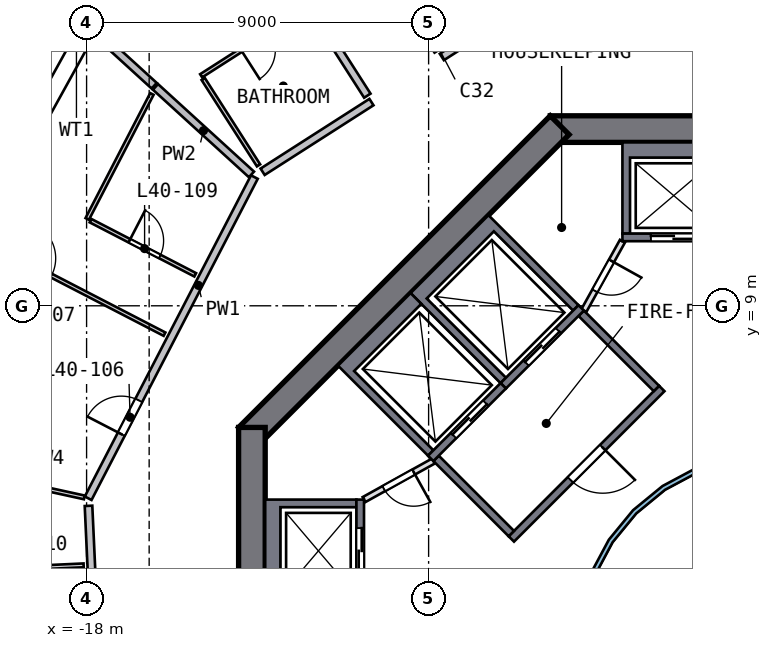
"""IFC4 building model, lengths in metres.
Left out: names, types, materials, properties, quantities, classifications, styles, units other than length and angle.
Written with IfcOpenShell. Run it as: python <this file> out.ifc"""

import sys

from ifc_helpers import new_model, si_unit, direction, frame, frame_2d, origin, place, context, subcontext, project, spatial, polyline, rectangle, outline, extrude, element, fill, save


model = new_model("IFC4")
c1 = context("Model", 3, precision=1e-05, world=origin(), true_north=direction((0.0, 1.0)))
c2 = subcontext(c1, "Body", "Model", "MODEL_VIEW")
j1 = project(units=[si_unit("LENGTHUNIT", "METRE"), si_unit("PLANEANGLEUNIT", "RADIAN")], contexts=[c1])
p1 = place(None, origin())
s1 = spatial("IfcSite", under=j1, at=p1, CompositionType="ELEMENT")
p2 = place(p1, origin())
s2 = spatial("IfcBuilding", under=s1, at=p2, CompositionType="ELEMENT")
p3 = place(p2, frame((0.0, 0.0, 165.5)))
s3 = spatial("IfcBuildingStorey", under=s2, at=p3, CompositionType="ELEMENT", Elevation=165.5)
p4 = place(p3, frame((5.799, 13.65, 0.0), z_axis=(0.0, 0.0, 1.0), x_axis=(-1.0, 0.0, 0.0)))
e1 = element("IfcWall", 1, at=p4, inside=s3, PredefinedType="SHEAR", context=c2, shape_type="SweptSolid", body=[
    extrude(rectangle(XDim=11.598, YDim=0.7, at=frame_2d((5.799, 0.0))), origin(), (0.0, 0.0, 1.0), 3.5),
])
p5 = place(p4, frame((4.899, 0.0, 0.0)))
e2 = element("IfcOpeningElement", 2, at=p5, cuts=e1, PredefinedType="OPENING", context=c2, shape_type="SweptSolid", body=[
    extrude(rectangle(XDim=1.8, YDim=2.1, at=frame_2d((0.9, 1.05))), frame((0.0, 0.36, 0.0), z_axis=(0.0, -1.0, 0.0), x_axis=(1.0, 0.0, 0.0)), (0.0, 0.0, 1.0), 0.72),
])
p6 = place(p3, frame((-5.552, 13.752, 0.0), z_axis=(0.0, 0.0, 1.0), x_axis=(-0.707106781, -0.707106781, 0.0)))
e3 = element("IfcWall", 3, at=p6, inside=s3, PredefinedType="SHEAR", context=c2, shape_type="SweptSolid", body=[
    extrude(rectangle(XDim=11.598, YDim=0.7, at=frame_2d((5.799, 0.0))), origin(), (0.0, 0.0, 1.0), 3.5),
])
p7 = place(p3, frame((-13.65, 5.799, 0.0), z_axis=(0.0, 0.0, 1.0), x_axis=(0.0, -1.0, 0.0)))
e4 = element("IfcWall", 4, at=p7, inside=s3, PredefinedType="SHEAR", context=c2, shape_type="SweptSolid", body=[
    extrude(rectangle(XDim=11.598, YDim=0.7, at=frame_2d((5.799, 0.0))), origin(), (0.0, 0.0, 1.0), 3.5),
])
p8 = place(p7, frame((4.899, 0.0, 0.0)))
e5 = element("IfcOpeningElement", 5, at=p8, cuts=e4, PredefinedType="OPENING", context=c2, shape_type="SweptSolid", body=[
    extrude(rectangle(XDim=1.8, YDim=2.1, at=frame_2d((0.9, 1.05))), frame((0.0, 0.36, 0.0), z_axis=(0.0, -1.0, 0.0), x_axis=(1.0, 0.0, 0.0)), (0.0, 0.0, 1.0), 0.72),
])
p9 = place(p3, origin())
e6 = element("IfcWall", 6, at=p9, inside=s3, PredefinedType="SOLIDWALL", context=c2, shape_type="SweptSolid", body=[
    extrude(outline(polyline([(-3.9, 10.9), (-3.9, 13.3), (-1.2, 13.3), (-1.2, 10.9), (-1.4, 10.9), (-1.4, 12.9), (-3.7, 12.9), (-3.7, 10.9), (-3.9, 10.9)])), origin(), (0.0, 0.0, 1.0), 3.0),
])
p10 = place(p3, frame((-1.2, 10.8, 0.0), z_axis=(0.0, 0.0, 1.0), x_axis=(-1.0, 0.0, 0.0)))
e7 = element("IfcWall", 7, at=p10, inside=s3, PredefinedType="SOLIDWALL", context=c2, shape_type="SweptSolid", body=[
    extrude(rectangle(XDim=2.7, YDim=0.2, at=frame_2d((1.35, 0.0))), origin(), (0.0, 0.0, 1.0), 3.0),
])
p11 = place(p10, frame((0.75, 0.0, 0.0)))
e8 = element("IfcOpeningElement", 8, at=p11, cuts=e7, PredefinedType="OPENING", context=c2, shape_type="SweptSolid", body=[
    extrude(rectangle(XDim=1.2, YDim=2.1, at=frame_2d((0.6, 1.05))), frame((0.0, 0.11, 0.0), z_axis=(0.0, -1.0, 0.0), x_axis=(1.0, 0.0, 0.0)), (0.0, 0.0, 1.0), 0.22),
])
p12 = place(p3, origin())
e9 = element("IfcWall", 9, at=p12, inside=s3, PredefinedType="SOLIDWALL", context=c2, shape_type="SweptSolid", body=[
    extrude(outline(polyline([(-13.3, 3.9), (-10.9, 3.9), (-10.9, 3.7), (-12.9, 3.7), (-12.9, 1.4), (-10.9, 1.4), (-10.9, 1.2), (-13.3, 1.2), (-13.3, 3.9)])), origin(), (0.0, 0.0, 1.0), 3.0),
])
p13 = place(p3, frame((-10.8, 1.2, 0.0), z_axis=(0.0, 0.0, 1.0), x_axis=(0.0, 1.0, 0.0)))
e10 = element("IfcWall", 10, at=p13, inside=s3, PredefinedType="SOLIDWALL", context=c2, shape_type="SweptSolid", body=[
    extrude(rectangle(XDim=2.7, YDim=0.2, at=frame_2d((1.35, 0.0))), origin(), (0.0, 0.0, 1.0), 3.0),
])
p14 = place(p13, frame((0.75, 0.0, 0.0)))
e11 = element("IfcOpeningElement", 11, at=p14, cuts=e10, PredefinedType="OPENING", context=c2, shape_type="SweptSolid", body=[
    extrude(rectangle(XDim=1.2, YDim=2.1, at=frame_2d((0.6, 1.05))), frame((0.0, 0.11, 0.0), z_axis=(0.0, -1.0, 0.0), x_axis=(1.0, 0.0, 0.0)), (0.0, 0.0, 1.0), 0.22),
])
p15 = place(p3, origin())
e12 = element("IfcWall", 12, at=p15, inside=s3, PredefinedType="SOLIDWALL", context=c2, shape_type="SweptSolid", body=[
    extrude(outline(polyline([(-9.475, 9.334), (-7.425, 11.385), (-5.056, 9.016), (-5.197, 8.874), (-7.283, 10.96), (-9.051, 9.192), (-6.965, 7.106), (-7.106, 6.965), (-9.475, 9.334)])), origin(), (0.0, 0.0, 1.0), 3.0),
])
p16 = place(p3, frame((-4.985, 8.945, 0.0), z_axis=(0.0, 0.0, 1.0), x_axis=(-0.707106781, -0.707106781, 0.0)))
e13 = element("IfcWall", 13, at=p16, inside=s3, PredefinedType="SOLIDWALL", context=c2, shape_type="SweptSolid", body=[
    extrude(rectangle(XDim=2.9, YDim=0.2, at=frame_2d((1.45, 0.0))), origin(), (0.0, 0.0, 1.0), 3.0),
])
p17 = place(p16, frame((0.85, 0.0, 0.0)))
e14 = element("IfcOpeningElement", 14, at=p17, cuts=e13, PredefinedType="OPENING", context=c2, shape_type="SweptSolid", body=[
    extrude(rectangle(XDim=1.2, YDim=2.1, at=frame_2d((0.6, 1.05))), frame((0.0, 0.11, 0.0), z_axis=(0.0, -1.0, 0.0), x_axis=(1.0, 0.0, 0.0)), (0.0, 0.0, 1.0), 0.22),
])
p18 = place(p3, origin())
e15 = element("IfcWall", 15, at=p18, inside=s3, PredefinedType="SOLIDWALL", context=c2, shape_type="SweptSolid", body=[
    extrude(outline(polyline([(-11.385, 7.425), (-9.475, 9.334), (-9.192, 9.051), (-10.96, 7.283), (-8.874, 5.197), (-9.016, 5.056), (-11.385, 7.425)])), origin(), (0.0, 0.0, 1.0), 3.0),
])
p19 = place(p3, frame((-7.036, 6.894, 0.0), z_axis=(0.0, 0.0, 1.0), x_axis=(-0.707106781, -0.707106781, 0.0)))
e16 = element("IfcWall", 16, at=p19, inside=s3, PredefinedType="SOLIDWALL", context=c2, shape_type="SweptSolid", body=[
    extrude(rectangle(XDim=2.7, YDim=0.2, at=frame_2d((1.35, 0.0))), origin(), (0.0, 0.0, 1.0), 3.0),
])
p20 = place(p19, frame((0.65, 0.0, 0.0)))
e17 = element("IfcOpeningElement", 17, at=p20, cuts=e16, PredefinedType="OPENING", context=c2, shape_type="SweptSolid", body=[
    extrude(rectangle(XDim=1.2, YDim=2.1, at=frame_2d((0.6, 1.05))), frame((0.0, 0.11, 0.0), z_axis=(0.0, -1.0, 0.0), x_axis=(1.0, 0.0, 0.0)), (0.0, 0.0, 1.0), 0.22),
])
p21 = place(p3, frame((-2.864, 6.823, 0.0), z_axis=(0.0, 0.0, 1.0), x_axis=(-0.707106781, -0.707106781, 0.0)))
e18 = element("IfcWall", 18, at=p21, inside=s3, PredefinedType="SOLIDWALL", context=c2, shape_type="SweptSolid", body=[
    extrude(rectangle(XDim=5.6, YDim=0.2, at=frame_2d((2.8, 0.0))), origin(), (0.0, 0.0, 1.0), 3.0),
])
p22 = place(p21, frame((2.2, 0.0, 0.0)))
e19 = element("IfcOpeningElement", 19, at=p22, cuts=e18, PredefinedType="OPENING", context=c2, shape_type="SweptSolid", body=[
    extrude(rectangle(XDim=1.2, YDim=2.1, at=frame_2d((0.6, 1.05))), frame((0.0, 0.11, 0.0), z_axis=(0.0, -1.0, 0.0), x_axis=(1.0, 0.0, 0.0)), (0.0, 0.0, 1.0), 0.22),
])
for number, where, z_axis, x_axis in (
    (20, (-3.005, 6.823, 0.0), (0.0, 0.0, 1.0), (-0.707, 0.707, 0.0)),
    (21, (-6.823, 3.005, 0.0), (0.0, 0.0, 1.0), (-0.707, 0.707, 0.0)),
):
    element("IfcWall", number, at=place(p3, frame(where, z_axis=z_axis, x_axis=x_axis)), inside=s3, PredefinedType="SOLIDWALL", context=c2, shape_type="SweptSolid", body=[
        extrude(rectangle(XDim=2.8, YDim=0.2, at=frame_2d((1.4, 0.0))), origin(), (0.0, 0.0, 1.0), 3.0),
    ])
p23 = place(p3, frame((-3.9, 10.7, 0.0), z_axis=(0.0, 0.0, 1.0), x_axis=(-0.485692555, -0.874129705, 0.0)))
e22 = element("IfcWall", 22, at=p23, inside=s3, PredefinedType="PARTITIONING", context=c2, shape_type="SweptSolid", body=[
    extrude(rectangle(XDim=2.089, YDim=0.15, at=frame_2d((1.044, 0.0))), origin(), (0.0, 0.0, 1.0), 3.0),
])
p24 = place(p23, frame((0.594, 0.0, 0.0)))
e23 = element("IfcOpeningElement", 23, at=p24, cuts=e22, PredefinedType="OPENING", context=c2, shape_type="SweptSolid", body=[
    extrude(rectangle(XDim=0.9, YDim=2.1, at=frame_2d((0.45, 1.05))), frame((0.0, 0.085, 0.0), z_axis=(0.0, -1.0, 0.0), x_axis=(1.0, 0.0, 0.0)), (0.0, 0.0, 1.0), 0.17),
])
p25 = place(p3, frame((-8.874, 4.914, 0.0), z_axis=(0.0, 0.0, 1.0), x_axis=(-0.874129705, -0.485692555, 0.0)))
e24 = element("IfcWall", 24, at=p25, inside=s3, PredefinedType="PARTITIONING", context=c2, shape_type="SweptSolid", body=[
    extrude(rectangle(XDim=2.089, YDim=0.15, at=frame_2d((1.044, 0.0))), origin(), (0.0, 0.0, 1.0), 3.0),
])
p26 = place(p25, frame((0.594, 0.0, 0.0)))
e25 = element("IfcOpeningElement", 25, at=p26, cuts=e24, PredefinedType="OPENING", context=c2, shape_type="SweptSolid", body=[
    extrude(rectangle(XDim=0.9, YDim=2.1, at=frame_2d((0.45, 1.05))), frame((0.0, 0.085, 0.0), z_axis=(0.0, -1.0, 0.0), x_axis=(1.0, 0.0, 0.0)), (0.0, 0.0, 1.0), 0.17),
])
p27 = place(p3, origin())
e26 = element("IfcWall", 26, at=p27, inside=s3, PredefinedType="SOLIDWALL", context=c2, shape_type="SweptSolid", body=[
    extrude(outline(polyline([(5.021, -0.999), (4.73, -1.959), (4.257, -2.844), (3.62, -3.62), (2.844, -4.257), (1.959, -4.73), (0.999, -5.021), (0.0, -5.12), (-0.999, -5.021), (-1.959, -4.73), (-2.844, -4.257), (-3.62, -3.62), (-4.257, -2.844), (-4.73, -1.959), (-5.021, -0.999), (-5.12, 0.0), (-5.021, 0.999), (-4.73, 1.959), (-4.257, 2.844), (-3.62, 3.62), (-2.844, 4.257), (-1.959, 4.73), (-0.999, 5.021), (0.0, 5.12), (0.999, 5.021), (1.959, 4.73), (2.844, 4.257), (3.62, 3.62), (4.257, 2.844), (4.73, 1.959), (5.021, 0.999), (5.12, 0.0), (5.021, -0.999)]), holes=[polyline([(4.904, 0.976), (4.619, 1.913), (4.157, 2.778), (3.535, 3.535), (2.778, 4.157), (1.913, 4.619), (0.976, 4.904), (0.0, 5.0), (-0.976, 4.904), (-1.913, 4.619), (-2.778, 4.157), (-3.535, 3.535), (-4.157, 2.778), (-4.619, 1.913), (-4.904, 0.976), (-5.0, 0.0), (-4.904, -0.976), (-4.619, -1.913), (-4.157, -2.778), (-3.535, -3.535), (-2.778, -4.157), (-1.913, -4.619), (-0.976, -4.904), (0.0, -5.0), (0.976, -4.904), (1.913, -4.619), (2.778, -4.157), (3.535, -3.535), (4.157, -2.778), (4.619, -1.913), (4.904, -0.976), (5.0, 0.0), (4.904, 0.976)])]), origin(), (0.0, 0.0, 1.0), 3.0),
])
p28 = place(p3, frame((-17.949, 3.736, 0.0), z_axis=(0.0, 0.0, 1.0), x_axis=(0.046061188, -0.99893862, 0.0)))
e27 = element("IfcWall", 27, at=p28, inside=s3, PredefinedType="SOLIDWALL", context=c2, shape_type="SweptSolid", body=[
    extrude(rectangle(XDim=9.117, YDim=0.2, at=frame_2d((4.558, 0.0))), origin(), (0.0, 0.0, 1.0), 3.0),
])
p29 = place(p3, frame((-17.959, 3.935, 0.0), z_axis=(0.0, 0.0, 1.0), x_axis=(0.459586917, 0.888132797, 0.0)))
e28 = element("IfcWall", 28, at=p29, inside=s3, PredefinedType="SOLIDWALL", context=c2, shape_type="SweptSolid", body=[
    extrude(rectangle(XDim=9.517, YDim=0.2, at=frame_2d((4.758, 0.0))), origin(), (0.0, 0.0, 1.0), 3.0),
])
p30 = place(p29, frame((1.9, 0.0, 0.0)))
e29 = element("IfcOpeningElement", 29, at=p30, cuts=e28, PredefinedType="OPENING", context=c2, shape_type="SweptSolid", body=[
    extrude(rectangle(XDim=1.0, YDim=2.1, at=frame_2d((0.5, 1.05))), frame((0.0, 0.11, 0.0), z_axis=(0.0, -1.0, 0.0), x_axis=(1.0, 0.0, 0.0)), (0.0, 0.0, 1.0), 0.22),
])
p31 = place(p3, frame((-14.55, 20.676, 0.0), z_axis=(0.0, 0.0, 1.0), x_axis=(0.539364002, -0.842072725, 0.0)))
e30 = element("IfcWall", 30, at=p31, inside=s3, PredefinedType="SOLIDWALL", context=c2, shape_type="SweptSolid", body=[
    extrude(rectangle(XDim=7.3, YDim=0.2, at=frame_2d((3.65, 0.0))), origin(), (0.0, 0.0, 1.0), 3.0),
])
p32 = place(p3, frame((-10.504, 14.361, 0.0), z_axis=(0.0, 0.0, 1.0), x_axis=(-0.842084863, -0.53934505, 0.0)))
e31 = element("IfcWall", 31, at=p32, inside=s3, PredefinedType="SOLIDWALL", context=c2, shape_type="SweptSolid", body=[
    extrude(rectangle(XDim=3.4, YDim=0.2, at=frame_2d((1.7, 0.0))), origin(), (0.0, 0.0, 1.0), 3.0),
])
p33 = place(p3, frame((-8.76, 15.716, 0.0), z_axis=(0.0, 0.0, 1.0), x_axis=(-0.539348812, 0.842082454, 0.0)))
e32 = element("IfcWall", 32, at=p33, inside=s3, PredefinedType="SOLIDWALL", context=c2, shape_type="SweptSolid", body=[
    extrude(rectangle(XDim=7.3, YDim=0.2, at=frame_2d((3.65, 0.0))), origin(), (0.0, 0.0, 1.0), 3.0),
])
p34 = place(p3, frame((-5.789, 17.381, 0.0), z_axis=(0.0, 0.0, 1.0), x_axis=(-0.84205225, -0.539395967, 0.0)))
e33 = element("IfcWall", 33, at=p34, inside=s3, PredefinedType="SOLIDWALL", context=c2, shape_type="SweptSolid", body=[
    extrude(rectangle(XDim=3.4, YDim=0.2, at=frame_2d((1.7, 0.0))), origin(), (0.0, 0.0, 1.0), 3.0),
])
p35 = place(p3, frame((-16.221, 14.792, 0.0), z_axis=(0.0, 0.0, 1.0), x_axis=(-0.738908354, 0.673805939, 0.0)))
e34 = element("IfcWall", 34, at=p35, inside=s3, PredefinedType="SOLIDWALL", context=c2, shape_type="SweptSolid", body=[
    extrude(rectangle(XDim=3.011, YDim=0.2, at=frame_2d((1.506, 0.0))), origin(), (0.0, 0.0, 1.0), 3.0),
])
p36 = place(p3, frame((-13.662, 12.457, 0.0), z_axis=(0.0, 0.0, 1.0), x_axis=(-0.738924468, 0.673788269, 0.0)))
e35 = element("IfcWall", 35, at=p36, inside=s3, PredefinedType="SOLIDWALL", context=c2, shape_type="SweptSolid", body=[
    extrude(rectangle(XDim=3.418, YDim=0.2, at=frame_2d((1.709, 0.0))), origin(), (0.0, 0.0, 1.0), 3.0),
])
p37 = place(p3, frame((-18.06, 3.958, 0.0), z_axis=(0.0, 0.0, 1.0), x_axis=(-0.976827652, 0.214027425, 0.0)))
e36 = element("IfcWall", 36, at=p37, inside=s3, PredefinedType="PARTITIONING", context=c2, shape_type="SweptSolid", body=[
    extrude(rectangle(XDim=6.476, YDim=0.1, at=frame_2d((3.238, 0.0))), origin(), (0.0, 0.0, 1.0), 3.0),
])
p38 = place(p37, frame((3.55, 0.0, 0.0)))
e37 = element("IfcOpeningElement", 37, at=p38, cuts=e36, PredefinedType="OPENING", context=c2, shape_type="SweptSolid", body=[
    extrude(rectangle(XDim=1.0, YDim=2.1, at=frame_2d((0.5, 1.05))), frame((0.0, 0.06, 0.0), z_axis=(0.0, -1.0, 0.0), x_axis=(1.0, 0.0, 0.0)), (0.0, 0.0, 1.0), 0.12),
])
p39 = place(p3, frame((-18.077, 2.17, 0.0), z_axis=(0.0, 0.0, 1.0), x_axis=(-0.998937799, -0.046079, 0.0)))
e38 = element("IfcWall", 38, at=p39, inside=s3, PredefinedType="PARTITIONING", context=c2, shape_type="SweptSolid", body=[
    extrude(rectangle(XDim=3.2, YDim=0.1, at=frame_2d((1.6, 0.0))), origin(), (0.0, 0.0, 1.0), 3.0),
])
p40 = place(p39, frame((1.05, 0.0, 0.0)))
e39 = element("IfcOpeningElement", 39, at=p40, cuts=e38, PredefinedType="OPENING", context=c2, shape_type="SweptSolid", body=[
    extrude(rectangle(XDim=0.9, YDim=2.1, at=frame_2d((0.45, 1.05))), frame((0.0, 0.06, 0.0), z_axis=(0.0, -1.0, 0.0), x_axis=(1.0, 0.0, 0.0)), (0.0, 0.0, 1.0), 0.12),
])
p41 = place(p3, frame((-21.412, 11.08, 0.0), z_axis=(0.0, 0.0, 1.0), x_axis=(0.888156748, -0.45954063, 0.0)))
e40 = element("IfcWall", 40, at=p41, inside=s3, PredefinedType="PARTITIONING", context=c2, shape_type="SweptSolid", body=[
    extrude(rectangle(XDim=6.15, YDim=0.1, at=frame_2d((3.075, 0.0))), origin(), (0.0, 0.0, 1.0), 3.0),
])
p42 = place(p41, frame((1.8, 0.0, 0.0)))
e41 = element("IfcOpeningElement", 41, at=p42, cuts=e40, PredefinedType="OPENING", context=c2, shape_type="SweptSolid", body=[
    extrude(rectangle(XDim=1.0, YDim=2.1, at=frame_2d((0.5, 1.05))), frame((0.0, 0.06, 0.0), z_axis=(0.0, -1.0, 0.0), x_axis=(1.0, 0.0, 0.0)), (0.0, 0.0, 1.0), 0.12),
])
p43 = place(p3, frame((-16.281, 14.575, 0.0), z_axis=(0.0, 0.0, 1.0), x_axis=(-0.459614775, -0.888118381, 0.0)))
e42 = element("IfcWall", 42, at=p43, inside=s3, PredefinedType="PARTITIONING", context=c2, shape_type="SweptSolid", body=[
    extrude(rectangle(XDim=3.704, YDim=0.1, at=frame_2d((1.852, 0.0))), origin(), (0.0, 0.0, 1.0), 3.0),
])
p44 = place(p3, frame((-17.895, 11.24, 0.0), z_axis=(0.0, 0.0, 1.0), x_axis=(0.88815114, -0.459551468, 0.0)))
e43 = element("IfcWall", 43, at=p44, inside=s3, PredefinedType="PARTITIONING", context=c2, shape_type="SweptSolid", body=[
    extrude(rectangle(XDim=3.1, YDim=0.1, at=frame_2d((1.55, 0.0))), origin(), (0.0, 0.0, 1.0), 3.0),
])
p45 = place(p44, frame((1.15, 0.0, 0.0)))
e44 = element("IfcOpeningElement", 44, at=p45, cuts=e43, PredefinedType="OPENING", context=c2, shape_type="SweptSolid", body=[
    extrude(rectangle(XDim=0.9, YDim=2.1, at=frame_2d((0.45, 1.05))), frame((0.0, 0.06, 0.0), z_axis=(0.0, -1.0, 0.0), x_axis=(1.0, 0.0, 0.0)), (0.0, 0.0, 1.0), 0.12),
])
p46 = place(p3, frame((-14.932, 14.969, 0.0), z_axis=(0.0, 0.0, 1.0), x_axis=(0.539394933, -0.842052912, 0.0)))
e45 = element("IfcWall", 45, at=p46, inside=s3, PredefinedType="PARTITIONING", context=c2, shape_type="SweptSolid", body=[
    extrude(rectangle(XDim=2.7, YDim=0.1, at=frame_2d((1.35, 0.0))), origin(), (0.0, 0.0, 1.0), 3.0),
])
p47 = place(p3, frame((-12.291, 16.779, 0.0), z_axis=(0.0, 0.0, 1.0), x_axis=(-0.842087061, -0.539341618, 0.0)))
e46 = element("IfcWall", 46, at=p47, inside=s3, PredefinedType="PARTITIONING", context=c2, shape_type="SweptSolid", body=[
    extrude(rectangle(XDim=3.2, YDim=0.1, at=frame_2d((1.6, 0.0))), origin(), (0.0, 0.0, 1.0), 3.0),
])
p48 = place(p47, frame((1.05, 0.0, 0.0)))
e47 = element("IfcOpeningElement", 47, at=p48, cuts=e46, PredefinedType="OPENING", context=c2, shape_type="SweptSolid", body=[
    extrude(rectangle(XDim=0.9, YDim=2.1, at=frame_2d((0.45, 1.05))), frame((0.0, 0.06, 0.0), z_axis=(0.0, -1.0, 0.0), x_axis=(1.0, 0.0, 0.0)), (0.0, 0.0, 1.0), 0.12),
])
p49 = place(p11, origin())
e48 = element("IfcDoor", 48, at=p49, inside=s3, OperationType="DOUBLE_DOOR_SLIDING", PredefinedType="DOOR", context=c2, shape_type="SweptSolid", body=[
    extrude(rectangle(XDim=1.2, YDim=2.1, at=frame_2d((0.6, 1.05))), frame((0.0, 0.025, 0.0), z_axis=(0.0, -1.0, 0.0), x_axis=(1.0, 0.0, 0.0)), (0.0, 0.0, 1.0), 0.05),
])
fill(e8, e48)
p50 = place(p14, origin())
e49 = element("IfcDoor", 49, at=p50, inside=s3, OperationType="DOUBLE_DOOR_SLIDING", PredefinedType="DOOR", context=c2, shape_type="SweptSolid", body=[
    extrude(rectangle(XDim=1.2, YDim=2.1, at=frame_2d((0.6, 1.05))), frame((0.0, 0.025, 0.0), z_axis=(0.0, -1.0, 0.0), x_axis=(1.0, 0.0, 0.0)), (0.0, 0.0, 1.0), 0.05),
])
fill(e11, e49)
p51 = place(p17, origin())
e50 = element("IfcDoor", 50, at=p51, inside=s3, OperationType="DOUBLE_DOOR_SLIDING", PredefinedType="DOOR", context=c2, shape_type="SweptSolid", body=[
    extrude(rectangle(XDim=1.2, YDim=2.1, at=frame_2d((0.6, 1.05))), frame((0.0, 0.025, 0.0), z_axis=(0.0, -1.0, 0.0), x_axis=(1.0, 0.0, 0.0)), (0.0, 0.0, 1.0), 0.05),
])
fill(e14, e50)
p52 = place(p20, origin())
e51 = element("IfcDoor", 51, at=p52, inside=s3, OperationType="DOUBLE_DOOR_SLIDING", PredefinedType="DOOR", context=c2, shape_type="SweptSolid", body=[
    extrude(rectangle(XDim=1.2, YDim=2.1, at=frame_2d((0.6, 1.05))), frame((0.0, 0.025, 0.0), z_axis=(0.0, -1.0, 0.0), x_axis=(1.0, 0.0, 0.0)), (0.0, 0.0, 1.0), 0.05),
])
fill(e17, e51)
p53 = place(p22, origin())
e52 = element("IfcDoor", 52, at=p53, inside=s3, OperationType="SINGLE_SWING_LEFT", PredefinedType="DOOR", context=c2, shape_type="SweptSolid", body=[
    extrude(rectangle(XDim=1.2, YDim=2.1, at=frame_2d((0.6, 1.05))), frame((0.0, 0.025, 0.0), z_axis=(0.0, -1.0, 0.0), x_axis=(1.0, 0.0, 0.0)), (0.0, 0.0, 1.0), 0.05),
])
fill(e19, e52)
p54 = place(p24, origin())
e53 = element("IfcDoor", 53, at=p54, inside=s3, OperationType="SINGLE_SWING_LEFT", PredefinedType="DOOR", context=c2, shape_type="SweptSolid", body=[
    extrude(rectangle(XDim=0.9, YDim=2.1, at=frame_2d((0.45, 1.05))), frame((0.0, 0.025, 0.0), z_axis=(0.0, -1.0, 0.0), x_axis=(1.0, 0.0, 0.0)), (0.0, 0.0, 1.0), 0.05),
])
fill(e23, e53)
p55 = place(p26, origin())
e54 = element("IfcDoor", 54, at=p55, inside=s3, OperationType="SINGLE_SWING_LEFT", PredefinedType="DOOR", context=c2, shape_type="SweptSolid", body=[
    extrude(rectangle(XDim=0.9, YDim=2.1, at=frame_2d((0.45, 1.05))), frame((0.0, 0.025, 0.0), z_axis=(0.0, -1.0, 0.0), x_axis=(1.0, 0.0, 0.0)), (0.0, 0.0, 1.0), 0.05),
])
fill(e25, e54)
p56 = place(p30, origin())
e55 = element("IfcDoor", 55, at=p56, inside=s3, OperationType="SINGLE_SWING_LEFT", PredefinedType="DOOR", context=c2, shape_type="SweptSolid", body=[
    extrude(rectangle(XDim=1.0, YDim=2.1, at=frame_2d((0.5, 1.05))), frame((0.0, 0.025, 0.0), z_axis=(0.0, -1.0, 0.0), x_axis=(1.0, 0.0, 0.0)), (0.0, 0.0, 1.0), 0.05),
])
fill(e29, e55)
p57 = place(p42, origin())
e56 = element("IfcDoor", 56, at=p57, inside=s3, OperationType="SINGLE_SWING_LEFT", PredefinedType="DOOR", context=c2, shape_type="SweptSolid", body=[
    extrude(rectangle(XDim=1.0, YDim=2.1, at=frame_2d((0.5, 1.05))), frame((0.0, 0.025, 0.0), z_axis=(0.0, -1.0, 0.0), x_axis=(1.0, 0.0, 0.0)), (0.0, 0.0, 1.0), 0.05),
])
fill(e41, e56)
p58 = place(p45, origin())
e57 = element("IfcDoor", 57, at=p58, inside=s3, OperationType="SINGLE_SWING_LEFT", PredefinedType="DOOR", context=c2, shape_type="SweptSolid", body=[
    extrude(rectangle(XDim=0.9, YDim=2.1, at=frame_2d((0.45, 1.05))), frame((0.0, 0.025, 0.0), z_axis=(0.0, -1.0, 0.0), x_axis=(1.0, 0.0, 0.0)), (0.0, 0.0, 1.0), 0.05),
])
fill(e44, e57)
save(model, sys.argv[1])
